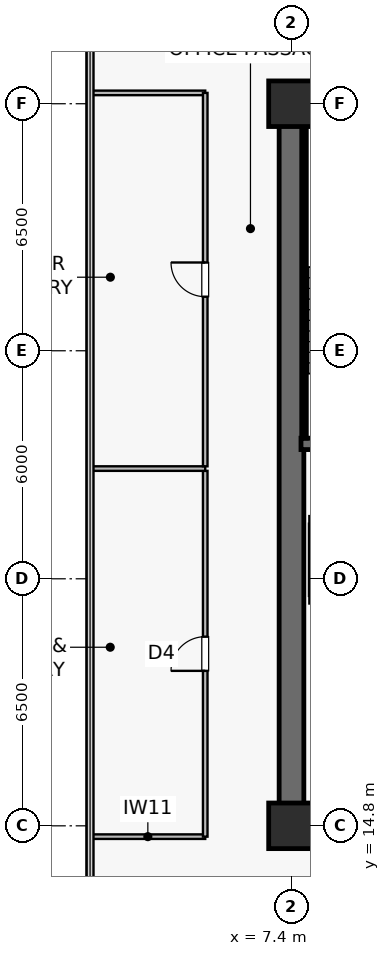
"""IFC4 building model, lengths in metres.
Left out: names, types, materials, properties, quantities, classifications, styles, units other than length and angle.
Written with IfcOpenShell. Run it as: python <this file> out.ifc"""

import sys

from ifc_helpers import new_model, si_unit, direction, frame, frame_2d, origin, origin_2d, place, context, subcontext, project, spatial, rectangle, extrude, source, transform, mapped, element, fill, save


model = new_model("IFC4")
c1 = context("Model", 3, precision=1e-05, world=origin(), true_north=direction((0.0, 1.0)))
c2 = subcontext(c1, "Body", "Model", "MODEL_VIEW")
j1 = project(units=[si_unit("LENGTHUNIT", "METRE"), si_unit("PLANEANGLEUNIT", "RADIAN")], contexts=[c1])
p1 = place(None, origin())
s1 = spatial("IfcSite", under=j1, at=p1, CompositionType="ELEMENT")
p2 = place(p1, origin())
s2 = spatial("IfcBuilding", under=s1, at=p2, CompositionType="ELEMENT")
p3 = place(p2, frame((0.0, 0.0, 170.7)))
s3 = spatial("IfcBuildingStorey", under=s2, at=p3, CompositionType="ELEMENT", Elevation=170.7)
p4 = place(p3, frame((7.075, 14.8, 0.0), z_axis=(0.0, 0.0, 1.0), x_axis=(1.0, 0.0, 0.0)))
e1 = element("IfcWall", 1, at=p4, inside=s3, PredefinedType="SHEAR", context=c2, shape_type="SweptSolid", body=[
    extrude(rectangle(XDim=15.45, YDim=0.65, at=frame_2d((7.725, 0.0))), origin(), (0.0, 0.0, 1.0), 3.79),
])
p5 = place(p3, frame((7.075, 33.8, 0.0), z_axis=(0.0, 0.0, 1.0), x_axis=(1.0, 0.0, 0.0)))
e2 = element("IfcWall", 2, at=p5, inside=s3, PredefinedType="SHEAR", context=c2, shape_type="SweptSolid", body=[
    extrude(rectangle(XDim=15.45, YDim=0.65, at=frame_2d((7.725, 0.0))), origin(), (0.0, 0.0, 1.0), 3.79),
])
p6 = place(p5, frame((5.25, 0.0, 0.0)))
e3 = element("IfcOpeningElement", 3, at=p6, cuts=e2, PredefinedType="OPENING", context=c2, shape_type="SweptSolid", body=[
    extrude(rectangle(XDim=0.95, YDim=2.15, at=frame_2d((0.475, 1.075))), frame((0.0, 0.335, 0.0), z_axis=(0.0, -1.0, 0.0), x_axis=(1.0, 0.0, 0.0)), (0.0, 0.0, 1.0), 0.67),
])
p7 = place(p5, frame((7.765, 0.0, 0.0)))
e4 = element("IfcOpeningElement", 4, at=p7, cuts=e2, PredefinedType="OPENING", context=c2, shape_type="SweptSolid", body=[
    extrude(rectangle(XDim=0.95, YDim=2.15, at=frame_2d((0.475, 1.075))), frame((0.0, 0.335, 0.0), z_axis=(0.0, -1.0, 0.0), x_axis=(1.0, 0.0, 0.0)), (0.0, 0.0, 1.0), 0.67),
])
p8 = place(p5, frame((10.315, 0.0, 0.0)))
e5 = element("IfcOpeningElement", 5, at=p8, cuts=e2, PredefinedType="OPENING", context=c2, shape_type="SweptSolid", body=[
    extrude(rectangle(XDim=0.95, YDim=2.15, at=frame_2d((0.475, 1.075))), frame((0.0, 0.335, 0.0), z_axis=(0.0, -1.0, 0.0), x_axis=(1.0, 0.0, 0.0)), (0.0, 0.0, 1.0), 0.67),
])
p9 = place(p5, frame((12.865, 0.0, 0.0)))
e6 = element("IfcOpeningElement", 6, at=p9, cuts=e2, PredefinedType="OPENING", context=c2, shape_type="SweptSolid", body=[
    extrude(rectangle(XDim=0.95, YDim=2.15, at=frame_2d((0.475, 1.075))), frame((0.0, 0.335, 0.0), z_axis=(0.0, -1.0, 0.0), x_axis=(1.0, 0.0, 0.0)), (0.0, 0.0, 1.0), 0.67),
])
p10 = place(p3, frame((7.4, 15.125, 0.0), z_axis=(0.0, 0.0, 1.0), x_axis=(0.0, 1.0, 0.0)))
e7 = element("IfcWall", 7, at=p10, inside=s3, PredefinedType="SHEAR", context=c2, shape_type="SweptSolid", body=[
    extrude(rectangle(XDim=18.35, YDim=0.65, at=frame_2d((9.175, 0.0))), origin(), (0.0, 0.0, 1.0), 3.79),
])
p11 = place(p3, frame((7.65, 24.85, 0.0), z_axis=(0.0, 0.0, 1.0), x_axis=(1.0, 0.0, 0.0)))
e8 = element("IfcWall", 8, at=p11, inside=s3, PredefinedType="SHEAR", context=c2, shape_type="SweptSolid", body=[
    extrude(rectangle(XDim=3.8, YDim=0.3, at=frame_2d((1.9, 0.0))), origin(), (0.0, 0.0, 1.0), 3.79),
])
p12 = place(p3, frame((7.73, 33.4, 0.0), z_axis=(0.0, 0.0, 1.0), x_axis=(1.0, 0.0, 0.0)))
e9 = element("IfcWall", 9, at=p12, inside=s3, PredefinedType="SOLIDWALL", context=c2, shape_type="SweptSolid", body=[
    extrude(rectangle(XDim=3.72, YDim=0.12, at=frame_2d((1.86, 0.0))), origin(), (0.0, 0.0, 1.0), 3.79),
])
p13 = place(p3, frame((7.73, 25.0, 0.0), z_axis=(0.0, 0.0, 1.0), x_axis=(0.0, 1.0, 0.0)))
e10 = element("IfcWall", 10, at=p13, inside=s3, PredefinedType="SOLIDWALL", context=c2, shape_type="SweptSolid", body=[
    extrude(rectangle(XDim=8.32, YDim=0.12, at=frame_2d((4.16, 0.0))), origin(), (0.0, 0.0, 1.0), 3.79),
])
m1 = source(origin(), c2, "Body", "SweptSolid", [
    extrude(rectangle(XDim=1.2, YDim=1.2, at=origin_2d()), origin(), (0.0, 0.0, 1.0), 4.1),
])
for number, where, z_axis, x_axis in (
    (11, (7.4, 14.8, 0.0), (0.0, 0.0, 1.0), (1.0, 0.0, 0.0)),
    (12, (7.4, 33.8, 0.0), (0.0, 0.0, 1.0), (1.0, 0.0, 0.0)),
):
    element("IfcColumn", number, at=place(p3, frame(where, z_axis=z_axis, x_axis=x_axis)), inside=s3, PredefinedType="COLUMN", context=c2, shape_type="MappedRepresentation", body=[
        mapped(m1, transform((0.0, 0.0, 0.0), scale=1.0)),
    ])
for number, where, z_axis, x_axis in (
    (13, (7.87, 20.75, 0.0), (0.0, 0.0, 1.0), (1.0, 0.0, 0.0)),
    (14, (7.87, 22.85, 0.0), (0.0, 0.0, 1.0), (1.0, 0.0, 0.0)),
):
    element("IfcWall", number, at=place(p3, frame(where, z_axis=z_axis, x_axis=x_axis)), inside=s3, PredefinedType="SOLIDWALL", context=c2, shape_type="SweptSolid", body=[
        extrude(rectangle(XDim=2.26, YDim=0.2, at=frame_2d((1.13, 0.0))), origin(), (0.0, 0.0, 1.0), 3.79),
    ])
p14 = place(p3, frame((7.95, 20.85, 0.0), z_axis=(0.0, 0.0, 1.0), x_axis=(0.0, 1.0, 0.0)))
e15 = element("IfcWall", 15, at=p14, inside=s3, PredefinedType="SOLIDWALL", context=c2, shape_type="SweptSolid", body=[
    extrude(rectangle(XDim=1.9, YDim=0.18, at=frame_2d((0.95, 0.0))), origin(), (0.0, 0.0, 1.0), 3.79),
])
for number, where, z_axis, x_axis in (
    (16, (2.11, 14.515, 0.0), (0.0, 0.0, 1.0), (1.0, 0.0, 0.0)),
    (17, (2.11, 34.085, 0.0), (0.0, 0.0, 1.0), (1.0, 0.0, 0.0)),
):
    element("IfcWall", number, at=place(p3, frame(where, z_axis=z_axis, x_axis=x_axis)), inside=s3, PredefinedType="PARTITIONING", context=c2, shape_type="SweptSolid", body=[
        extrude(rectangle(XDim=3.02, YDim=0.12, at=frame_2d((1.51, 0.0))), origin(), (0.0, 0.0, 1.0), 3.79),
    ])
p15 = place(p3, frame((5.13, 14.515, 0.0), z_axis=(0.0, 0.0, 1.0), x_axis=(0.0, 1.0, 0.0)))
e18 = element("IfcWall", 18, at=p15, inside=s3, PredefinedType="PARTITIONING", context=c2, shape_type="SweptSolid", body=[
    extrude(rectangle(XDim=9.625, YDim=0.12, at=frame_2d((4.812, 0.0))), origin(), (0.0, 0.0, 1.0), 3.79),
])
p16 = place(p15, frame((4.363, 0.0, 0.0)))
e19 = element("IfcOpeningElement", 19, at=p16, cuts=e18, PredefinedType="OPENING", context=c2, shape_type="SweptSolid", body=[
    extrude(rectangle(XDim=0.9, YDim=2.1, at=frame_2d((0.45, 1.05))), frame((0.0, 0.07, 0.0), z_axis=(0.0, -1.0, 0.0), x_axis=(1.0, 0.0, 0.0)), (0.0, 0.0, 1.0), 0.14),
])
p17 = place(p3, frame((2.11, 24.2, 0.0), z_axis=(0.0, 0.0, 1.0), x_axis=(1.0, 0.0, 0.0)))
e20 = element("IfcWall", 20, at=p17, inside=s3, PredefinedType="PARTITIONING", context=c2, shape_type="SweptSolid", body=[
    extrude(rectangle(XDim=3.02, YDim=0.12, at=frame_2d((1.51, 0.0))), origin(), (0.0, 0.0, 1.0), 3.79),
])
p18 = place(p3, frame((5.13, 24.26, 0.0), z_axis=(0.0, 0.0, 1.0), x_axis=(0.0, 1.0, 0.0)))
e21 = element("IfcWall", 21, at=p18, inside=s3, PredefinedType="PARTITIONING", context=c2, shape_type="SweptSolid", body=[
    extrude(rectangle(XDim=9.825, YDim=0.12, at=frame_2d((4.913, 0.0))), origin(), (0.0, 0.0, 1.0), 3.79),
])
p19 = place(p18, frame((4.462, 0.0, 0.0)))
e22 = element("IfcOpeningElement", 22, at=p19, cuts=e21, PredefinedType="OPENING", context=c2, shape_type="SweptSolid", body=[
    extrude(rectangle(XDim=0.9, YDim=2.1, at=frame_2d((0.45, 1.05))), frame((0.0, 0.07, 0.0), z_axis=(0.0, -1.0, 0.0), x_axis=(1.0, 0.0, 0.0)), (0.0, 0.0, 1.0), 0.14),
])
m2 = source(origin(), c2, "Body", "SweptSolid", [
    extrude(rectangle(XDim=0.9, YDim=2.1, at=frame_2d((0.45, 1.05))), frame((0.0, 0.025, 0.0), z_axis=(0.0, -1.0, 0.0), x_axis=(1.0, 0.0, 0.0)), (0.0, 0.0, 1.0), 0.05),
])
p20 = place(p16, origin())
e23 = element("IfcDoor", 23, at=p20, inside=s3, OperationType="SINGLE_SWING_LEFT", PredefinedType="DOOR", context=c2, shape_type="MappedRepresentation", body=[
    mapped(m2, transform((0.0, 0.0, 0.0), scale=1.0)),
])
fill(e19, e23)
p21 = place(p19, origin())
e24 = element("IfcDoor", 24, at=p21, inside=s3, OperationType="SINGLE_SWING_RIGHT", PredefinedType="DOOR", context=c2, shape_type="MappedRepresentation", body=[
    mapped(m2, transform((0.0, 0.0, 0.0), scale=1.0)),
])
fill(e22, e24)
save(model, sys.argv[1])
